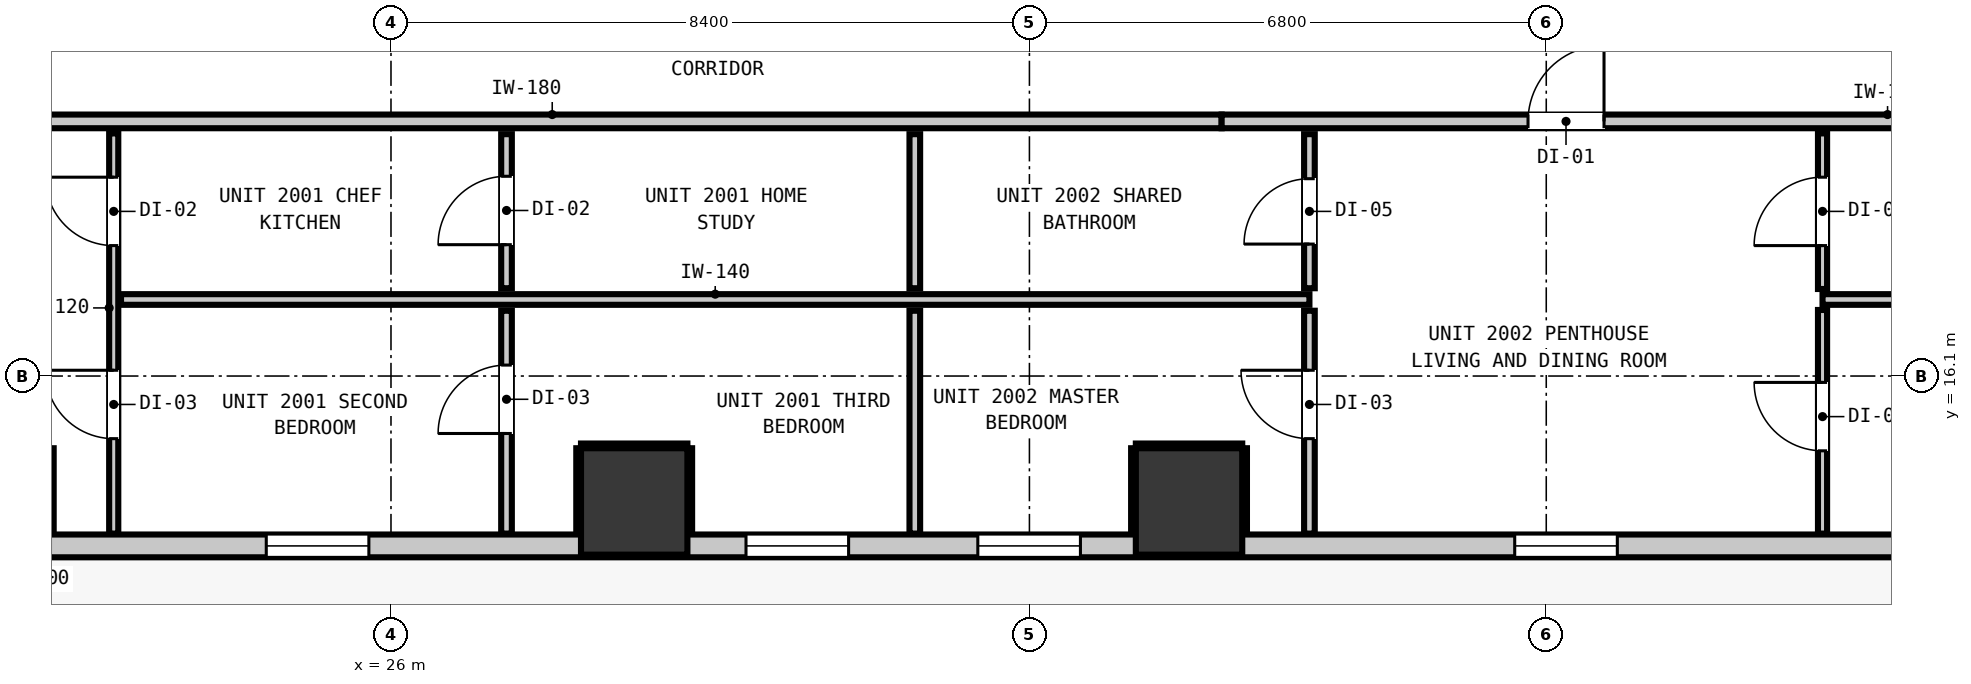
"""IFC4 building model, lengths in metres.
Left out: names, types, materials, properties, quantities, classifications, styles, units other than length and angle.
Written with IfcOpenShell. Run it as: python <this file> out.ifc"""

import sys

from ifc_helpers import new_model, si_unit, direction, frame, frame_2d, origin, origin_2d, place, context, subcontext, project, spatial, rectangle, extrude, element, fill, save


model = new_model("IFC4")
c1 = context("Model", 3, precision=1e-05, world=origin(), true_north=direction((0.0, 1.0)))
c2 = subcontext(c1, "Body", "Model", "MODEL_VIEW")
j1 = project(units=[si_unit("LENGTHUNIT", "METRE"), si_unit("PLANEANGLEUNIT", "RADIAN")], contexts=[c1])
p1 = place(None, origin())
s1 = spatial("IfcSite", under=j1, at=p1, CompositionType="ELEMENT")
p2 = place(p1, origin())
s2 = spatial("IfcBuilding", under=s1, at=p2, CompositionType="ELEMENT")
p3 = place(p2, frame((0.0, 0.0, 71.8)))
s3 = spatial("IfcBuildingStorey", under=s2, at=p3, CompositionType="ELEMENT", Elevation=71.8)
for number, where, z_axis, x_axis in (
    (1, (29.2, 14.45, 0.0), (0.0, 0.0, 1.0), (1.0, 0.0, 0.0)),
    (2, (36.5, 14.45, 0.0), (0.0, 0.0, 1.0), (1.0, 0.0, 0.0)),
):
    element("IfcColumn", number, at=place(p3, frame(where, z_axis=z_axis, x_axis=x_axis)), inside=s3, PredefinedType="COLUMN", context=c2, shape_type="SweptSolid", body=[
        extrude(rectangle(XDim=1.4, YDim=1.4, at=origin_2d()), origin(), (0.0, 0.0, 1.0), 3.32),
    ])
p4 = place(p3, frame((47.835, 13.865, 0.0), z_axis=(0.0, 0.0, 1.0), x_axis=(-1.0, 0.0, 0.0)))
e3 = element("IfcWall", 3, at=p4, inside=s3, PredefinedType="STANDARD", context=c2, shape_type="SweptSolid", body=[
    extrude(rectangle(XDim=37.47, YDim=0.3, at=frame_2d((18.735, 0.0))), origin(), (0.0, 0.0, 1.0), 3.06),
])
p5 = place(p4, frame((0.901, 0.0, 0.0)))
e4 = element("IfcOpeningElement", 4, at=p5, cuts=e3, PredefinedType="OPENING", context=c2, shape_type="SweptSolid", body=[
    extrude(rectangle(XDim=1.0, YDim=2.15, at=frame_2d((0.5, 1.075))), frame((0.0, 0.16, 0.0), z_axis=(0.0, -1.0, 0.0), x_axis=(1.0, 0.0, 0.0)), (0.0, 0.0, 1.0), 0.32),
])
p6 = place(p4, frame((29.57, 0.0, 0.85)))
e5 = element("IfcOpeningElement", 5, at=p6, cuts=e3, PredefinedType="OPENING", context=c2, shape_type="SweptSolid", body=[
    extrude(rectangle(XDim=1.35, YDim=1.85, at=frame_2d((0.675, 0.925))), frame((0.0, 0.16, 0.0), z_axis=(0.0, -1.0, 0.0), x_axis=(1.0, 0.0, 0.0)), (0.0, 0.0, 1.0), 0.32),
])
p7 = place(p4, frame((35.583, 0.0, 0.85)))
e6 = element("IfcOpeningElement", 6, at=p7, cuts=e3, PredefinedType="OPENING", context=c2, shape_type="SweptSolid", body=[
    extrude(rectangle(XDim=1.35, YDim=1.85, at=frame_2d((0.675, 0.925))), frame((0.0, 0.16, 0.0), z_axis=(0.0, -1.0, 0.0), x_axis=(1.0, 0.0, 0.0)), (0.0, 0.0, 1.0), 0.32),
])
p8 = place(p4, frame((22.126, 0.0, 0.85)))
e7 = element("IfcOpeningElement", 7, at=p8, cuts=e3, PredefinedType="OPENING", context=c2, shape_type="SweptSolid", body=[
    extrude(rectangle(XDim=1.35, YDim=1.85, at=frame_2d((0.675, 0.925))), frame((0.0, 0.16, 0.0), z_axis=(0.0, -1.0, 0.0), x_axis=(1.0, 0.0, 0.0)), (0.0, 0.0, 1.0), 0.32),
])
p9 = place(p4, frame((15.814, 0.0, 0.85)))
e8 = element("IfcOpeningElement", 8, at=p9, cuts=e3, PredefinedType="OPENING", context=c2, shape_type="SweptSolid", body=[
    extrude(rectangle(XDim=1.35, YDim=1.85, at=frame_2d((0.675, 0.925))), frame((0.0, 0.16, 0.0), z_axis=(0.0, -1.0, 0.0), x_axis=(1.0, 0.0, 0.0)), (0.0, 0.0, 1.0), 0.32),
])
p10 = place(p4, frame((5.7, 0.0, 0.85)))
e9 = element("IfcOpeningElement", 9, at=p10, cuts=e3, PredefinedType="OPENING", context=c2, shape_type="SweptSolid", body=[
    extrude(rectangle(XDim=1.35, YDim=1.85, at=frame_2d((0.675, 0.925))), frame((0.0, 0.16, 0.0), z_axis=(0.0, -1.0, 0.0), x_axis=(1.0, 0.0, 0.0)), (0.0, 0.0, 1.0), 0.32),
])
p11 = place(p4, frame((12.764, 0.0, 0.85)))
e10 = element("IfcOpeningElement", 10, at=p11, cuts=e3, PredefinedType="OPENING", context=c2, shape_type="SweptSolid", body=[
    extrude(rectangle(XDim=1.35, YDim=1.85, at=frame_2d((0.675, 0.925))), frame((0.0, 0.16, 0.0), z_axis=(0.0, -1.0, 0.0), x_axis=(1.0, 0.0, 0.0)), (0.0, 0.0, 1.0), 0.32),
])
p12 = place(p3, frame((8.027, 19.45, 0.0), z_axis=(0.0, 0.0, 1.0), x_axis=(1.0, 0.0, 0.0)))
e11 = element("IfcWall", 11, at=p12, inside=s3, PredefinedType="PARTITIONING", context=c2, shape_type="SweptSolid", body=[
    extrude(rectangle(XDim=28.902, YDim=0.18, at=frame_2d((14.451, 0.0))), origin(), (0.0, 0.0, 1.0), 3.06),
])
p13 = place(p12, frame((10.187, 0.0, 0.0)))
e12 = element("IfcOpeningElement", 12, at=p13, cuts=e11, PredefinedType="OPENING", context=c2, shape_type="SweptSolid", body=[
    extrude(rectangle(XDim=1.0, YDim=2.15, at=frame_2d((0.5, 1.075))), frame((0.0, 0.1, 0.0), z_axis=(0.0, -1.0, 0.0), x_axis=(1.0, 0.0, 0.0)), (0.0, 0.0, 1.0), 0.2),
])
p14 = place(p3, frame((36.929, 19.45, 0.0), z_axis=(0.0, 0.0, 1.0), x_axis=(1.0, 0.0, 0.0)))
e13 = element("IfcWall", 13, at=p14, inside=s3, PredefinedType="PARTITIONING", context=c2, shape_type="SweptSolid", body=[
    extrude(rectangle(XDim=12.392, YDim=0.18, at=frame_2d((6.196, 0.0))), origin(), (0.0, 0.0, 1.0), 2.445),
])
p15 = place(p14, frame((4.031, 0.0, 0.0)))
e14 = element("IfcOpeningElement", 14, at=p15, cuts=e13, PredefinedType="OPENING", context=c2, shape_type="SweptSolid", body=[
    extrude(rectangle(XDim=1.0, YDim=2.15, at=frame_2d((0.5, 1.075))), frame((0.0, 0.1, 0.0), z_axis=(0.0, -1.0, 0.0), x_axis=(1.0, 0.0, 0.0)), (0.0, 0.0, 1.0), 0.2),
])
p16 = place(p3, frame((22.448, 17.107, 0.0), z_axis=(0.0, 0.0, 1.0), x_axis=(1.0, 0.0, 0.0)))
e15 = element("IfcWall", 15, at=p16, inside=s3, PredefinedType="PARTITIONING", context=c2, shape_type="SweptSolid", body=[
    extrude(rectangle(XDim=15.636, YDim=0.14, at=frame_2d((7.818, 0.0))), origin(), (0.0, 0.0, 1.0), 3.06),
])
p17 = place(p3, frame((44.835, 17.107, 0.0), z_axis=(0.0, 0.0, 1.0), x_axis=(1.0, 0.0, 0.0)))
e16 = element("IfcWall", 16, at=p17, inside=s3, PredefinedType="PARTITIONING", context=c2, shape_type="SweptSolid", body=[
    extrude(rectangle(XDim=5.338, YDim=0.14, at=frame_2d((2.669, 0.0))), origin(), (0.0, 0.0, 1.0), 3.06),
])
p18 = place(p3, frame((27.52, 14.027, 0.0), z_axis=(0.0, 0.0, 1.0), x_axis=(0.0, 1.0, 0.0)))
e17 = element("IfcWall", 17, at=p18, inside=s3, PredefinedType="PARTITIONING", context=c2, shape_type="SweptSolid", body=[
    extrude(rectangle(XDim=2.932, YDim=0.14, at=frame_2d((1.466, 0.0))), origin(), (0.0, 0.0, 1.0), 3.06),
])
p19 = place(p18, frame((1.317, 0.0, 0.0)))
e18 = element("IfcOpeningElement", 18, at=p19, cuts=e17, PredefinedType="OPENING", context=c2, shape_type="SweptSolid", body=[
    extrude(rectangle(XDim=0.9, YDim=2.1, at=frame_2d((0.45, 1.05))), frame((0.0, 0.08, 0.0), z_axis=(0.0, -1.0, 0.0), x_axis=(1.0, 0.0, 0.0)), (0.0, 0.0, 1.0), 0.16),
])
p20 = place(p3, frame((27.52, 17.255, 0.0), z_axis=(0.0, 0.0, 1.0), x_axis=(0.0, 1.0, 0.0)))
e19 = element("IfcWall", 19, at=p20, inside=s3, PredefinedType="PARTITIONING", context=c2, shape_type="SweptSolid", body=[
    extrude(rectangle(XDim=2.027, YDim=0.14, at=frame_2d((1.014, 0.0))), origin(), (0.0, 0.0, 1.0), 3.06),
])
p21 = place(p20, frame((0.573, 0.0, 0.0)))
e20 = element("IfcOpeningElement", 20, at=p21, cuts=e19, PredefinedType="OPENING", context=c2, shape_type="SweptSolid", body=[
    extrude(rectangle(XDim=0.9, YDim=2.1, at=frame_2d((0.45, 1.05))), frame((0.0, 0.08, 0.0), z_axis=(0.0, -1.0, 0.0), x_axis=(1.0, 0.0, 0.0)), (0.0, 0.0, 1.0), 0.16),
])
p22 = place(p3, frame((32.892, 14.027, 0.0), z_axis=(0.0, 0.0, 1.0), x_axis=(0.0, 1.0, 0.0)))
e21 = element("IfcWall", 21, at=p22, inside=s3, PredefinedType="PARTITIONING", context=c2, shape_type="SweptSolid", body=[
    extrude(rectangle(XDim=2.932, YDim=0.14, at=frame_2d((1.466, 0.0))), origin(), (0.0, 0.0, 1.0), 3.06),
])
p23 = place(p3, frame((32.892, 17.255, 0.0), z_axis=(0.0, 0.0, 1.0), x_axis=(0.0, 1.0, 0.0)))
e22 = element("IfcWall", 22, at=p23, inside=s3, PredefinedType="PARTITIONING", context=c2, shape_type="SweptSolid", body=[
    extrude(rectangle(XDim=2.027, YDim=0.14, at=frame_2d((1.014, 0.0))), origin(), (0.0, 0.0, 1.0), 3.06),
])
p24 = place(p3, frame((38.084, 14.027, 0.0), z_axis=(0.0, 0.0, 1.0), x_axis=(0.0, 1.0, 0.0)))
e23 = element("IfcWall", 23, at=p24, inside=s3, PredefinedType="PARTITIONING", context=c2, shape_type="SweptSolid", body=[
    extrude(rectangle(XDim=2.932, YDim=0.14, at=frame_2d((1.466, 0.0))), origin(), (0.0, 0.0, 1.0), 3.06),
])
p25 = place(p24, frame((1.249, 0.0, 0.0)))
e24 = element("IfcOpeningElement", 24, at=p25, cuts=e23, PredefinedType="OPENING", context=c2, shape_type="SweptSolid", body=[
    extrude(rectangle(XDim=0.9, YDim=2.1, at=frame_2d((0.45, 1.05))), frame((0.0, 0.08, 0.0), z_axis=(0.0, -1.0, 0.0), x_axis=(1.0, 0.0, 0.0)), (0.0, 0.0, 1.0), 0.16),
])
p26 = place(p3, frame((38.084, 17.255, 0.0), z_axis=(0.0, 0.0, 1.0), x_axis=(0.0, 1.0, 0.0)))
e25 = element("IfcWall", 25, at=p26, inside=s3, PredefinedType="PARTITIONING", context=c2, shape_type="SweptSolid", body=[
    extrude(rectangle(XDim=2.027, YDim=0.14, at=frame_2d((1.014, 0.0))), origin(), (0.0, 0.0, 1.0), 3.06),
])
p27 = place(p26, frame((0.581, 0.0, 0.0)))
e26 = element("IfcOpeningElement", 26, at=p27, cuts=e25, PredefinedType="OPENING", context=c2, shape_type="SweptSolid", body=[
    extrude(rectangle(XDim=0.86, YDim=2.02, at=frame_2d((0.43, 1.01))), frame((0.0, 0.08, 0.0), z_axis=(0.0, -1.0, 0.0), x_axis=(1.0, 0.0, 0.0)), (0.0, 0.0, 1.0), 0.16),
])
p28 = place(p3, frame((22.352, 14.027, 0.0), z_axis=(0.0, 0.0, 1.0), x_axis=(0.0, 1.0, 0.0)))
e27 = element("IfcWall", 27, at=p28, inside=s3, PredefinedType="PARTITIONING", context=c2, shape_type="SweptSolid", body=[
    extrude(rectangle(XDim=5.265, YDim=0.12, at=frame_2d((2.632, 0.0))), origin(), (0.0, 0.0, 1.0), 3.06),
])
p29 = place(p28, frame((3.789, 0.0, 0.0)))
e28 = element("IfcOpeningElement", 28, at=p29, cuts=e27, PredefinedType="OPENING", context=c2, shape_type="SweptSolid", body=[
    extrude(rectangle(XDim=0.9, YDim=2.1, at=frame_2d((0.45, 1.05))), frame((0.0, 0.07, 0.0), z_axis=(0.0, -1.0, 0.0), x_axis=(1.0, 0.0, 0.0)), (0.0, 0.0, 1.0), 0.14),
])
p30 = place(p28, frame((1.249, 0.0, 0.0)))
e29 = element("IfcOpeningElement", 29, at=p30, cuts=e27, PredefinedType="OPENING", context=c2, shape_type="SweptSolid", body=[
    extrude(rectangle(XDim=0.9, YDim=2.1, at=frame_2d((0.45, 1.05))), frame((0.0, 0.07, 0.0), z_axis=(0.0, -1.0, 0.0), x_axis=(1.0, 0.0, 0.0)), (0.0, 0.0, 1.0), 0.14),
])
p31 = place(p3, frame((44.835, 14.027, 0.0), z_axis=(0.0, 0.0, 1.0), x_axis=(0.0, 1.0, 0.0)))
e30 = element("IfcWall", 30, at=p31, inside=s3, PredefinedType="PARTITIONING", context=c2, shape_type="SweptSolid", body=[
    extrude(rectangle(XDim=2.942, YDim=0.12, at=frame_2d((1.471, 0.0))), origin(), (0.0, 0.0, 1.0), 3.06),
])
p32 = place(p31, frame((1.089, 0.0, 0.0)))
e31 = element("IfcOpeningElement", 31, at=p32, cuts=e30, PredefinedType="OPENING", context=c2, shape_type="SweptSolid", body=[
    extrude(rectangle(XDim=0.9, YDim=2.1, at=frame_2d((0.45, 1.05))), frame((0.0, 0.07, 0.0), z_axis=(0.0, -1.0, 0.0), x_axis=(1.0, 0.0, 0.0)), (0.0, 0.0, 1.0), 0.14),
])
p33 = place(p3, frame((44.835, 17.245, 0.0), z_axis=(0.0, 0.0, 1.0), x_axis=(0.0, 1.0, 0.0)))
e32 = element("IfcWall", 32, at=p33, inside=s3, PredefinedType="PARTITIONING", context=c2, shape_type="SweptSolid", body=[
    extrude(rectangle(XDim=2.047, YDim=0.12, at=frame_2d((1.023, 0.0))), origin(), (0.0, 0.0, 1.0), 3.06),
])
p34 = place(p33, frame((0.571, 0.0, 0.0)))
e33 = element("IfcOpeningElement", 33, at=p34, cuts=e32, PredefinedType="OPENING", context=c2, shape_type="SweptSolid", body=[
    extrude(rectangle(XDim=0.9, YDim=2.1, at=frame_2d((0.45, 1.05))), frame((0.0, 0.07, 0.0), z_axis=(0.0, -1.0, 0.0), x_axis=(1.0, 0.0, 0.0)), (0.0, 0.0, 1.0), 0.14),
])
p35 = place(p3, frame((21.532, 14.03, 0.0), z_axis=(0.0, 0.0, 1.0), x_axis=(0.0, 1.0, 0.0)))
e34 = element("IfcWall", 34, at=p35, inside=s3, PredefinedType="PARTITIONING", context=c2, shape_type="SweptSolid", body=[
    extrude(rectangle(XDim=1.12, YDim=0.06, at=frame_2d((0.56, 0.0))), origin(), (0.0, 0.0, 1.0), 1.45),
])
p36 = place(p3, frame((28.5, 15.182, 0.0), z_axis=(0.0, 0.0, 1.0), x_axis=(1.0, 0.0, 0.0)))
e35 = element("IfcWall", 35, at=p36, inside=s3, PredefinedType="PARTITIONING", context=c2, shape_type="SweptSolid", body=[
    extrude(rectangle(XDim=1.4, YDim=0.06, at=frame_2d((0.7, 0.0))), origin(), (0.0, 0.0, 1.0), 1.45),
])
for number, where, z_axis, x_axis in (
    (36, (28.468, 14.03, 0.0), (0.0, 0.0, 1.0), (0.0, 1.0, 0.0)),
    (37, (29.932, 14.03, 0.0), (0.0, 0.0, 1.0), (0.0, 1.0, 0.0)),
):
    element("IfcWall", number, at=place(p3, frame(where, z_axis=z_axis, x_axis=x_axis)), inside=s3, PredefinedType="PARTITIONING", context=c2, shape_type="SweptSolid", body=[
        extrude(rectangle(XDim=1.12, YDim=0.06, at=frame_2d((0.56, 0.0))), origin(), (0.0, 0.0, 1.0), 1.45),
    ])
p37 = place(p3, frame((35.8, 15.182, 0.0), z_axis=(0.0, 0.0, 1.0), x_axis=(1.0, 0.0, 0.0)))
e38 = element("IfcWall", 38, at=p37, inside=s3, PredefinedType="PARTITIONING", context=c2, shape_type="SweptSolid", body=[
    extrude(rectangle(XDim=1.4, YDim=0.06, at=frame_2d((0.7, 0.0))), origin(), (0.0, 0.0, 1.0), 1.45),
])
for number, where, z_axis, x_axis in (
    (39, (35.768, 14.03, 0.0), (0.0, 0.0, 1.0), (0.0, 1.0, 0.0)),
    (40, (37.232, 14.03, 0.0), (0.0, 0.0, 1.0), (0.0, 1.0, 0.0)),
):
    element("IfcWall", number, at=place(p3, frame(where, z_axis=z_axis, x_axis=x_axis)), inside=s3, PredefinedType="PARTITIONING", context=c2, shape_type="SweptSolid", body=[
        extrude(rectangle(XDim=1.12, YDim=0.06, at=frame_2d((0.56, 0.0))), origin(), (0.0, 0.0, 1.0), 1.45),
    ])
p38 = place(p8, origin())
e41 = element("IfcWindow", 41, at=p38, inside=s3, PartitioningType="SINGLE_PANEL", PredefinedType="WINDOW", context=c2, shape_type="SweptSolid", body=[
    extrude(rectangle(XDim=1.35, YDim=1.85, at=frame_2d((0.675, 0.925))), frame((0.0, 0.03, 0.0), z_axis=(0.0, -1.0, 0.0), x_axis=(1.0, 0.0, 0.0)), (0.0, 0.0, 1.0), 0.06),
])
fill(e7, e41)
p39 = place(p9, origin())
e42 = element("IfcWindow", 42, at=p39, inside=s3, PartitioningType="SINGLE_PANEL", PredefinedType="WINDOW", context=c2, shape_type="SweptSolid", body=[
    extrude(rectangle(XDim=1.35, YDim=1.85, at=frame_2d((0.675, 0.925))), frame((0.0, 0.03, 0.0), z_axis=(0.0, -1.0, 0.0), x_axis=(1.0, 0.0, 0.0)), (0.0, 0.0, 1.0), 0.06),
])
fill(e8, e42)
p40 = place(p10, origin())
e43 = element("IfcWindow", 43, at=p40, inside=s3, PartitioningType="SINGLE_PANEL", PredefinedType="WINDOW", context=c2, shape_type="SweptSolid", body=[
    extrude(rectangle(XDim=1.35, YDim=1.85, at=frame_2d((0.675, 0.925))), frame((0.0, 0.03, 0.0), z_axis=(0.0, -1.0, 0.0), x_axis=(1.0, 0.0, 0.0)), (0.0, 0.0, 1.0), 0.06),
])
fill(e9, e43)
p41 = place(p11, origin())
e44 = element("IfcWindow", 44, at=p41, inside=s3, PartitioningType="SINGLE_PANEL", PredefinedType="WINDOW", context=c2, shape_type="SweptSolid", body=[
    extrude(rectangle(XDim=1.35, YDim=1.85, at=frame_2d((0.675, 0.925))), frame((0.0, 0.03, 0.0), z_axis=(0.0, -1.0, 0.0), x_axis=(1.0, 0.0, 0.0)), (0.0, 0.0, 1.0), 0.06),
])
fill(e10, e44)
p42 = place(p29, origin())
e45 = element("IfcDoor", 45, at=p42, inside=s3, OperationType="SINGLE_SWING_RIGHT", PredefinedType="DOOR", context=c2, shape_type="SweptSolid", body=[
    extrude(rectangle(XDim=0.9, YDim=2.1, at=frame_2d((0.45, 1.05))), frame((0.0, 0.025, 0.0), z_axis=(0.0, -1.0, 0.0), x_axis=(1.0, 0.0, 0.0)), (0.0, 0.0, 1.0), 0.05),
])
fill(e28, e45)
p43 = place(p21, origin())
e46 = element("IfcDoor", 46, at=p43, inside=s3, OperationType="SINGLE_SWING_LEFT", PredefinedType="DOOR", context=c2, shape_type="SweptSolid", body=[
    extrude(rectangle(XDim=0.9, YDim=2.1, at=frame_2d((0.45, 1.05))), frame((0.0, 0.025, 0.0), z_axis=(0.0, -1.0, 0.0), x_axis=(1.0, 0.0, 0.0)), (0.0, 0.0, 1.0), 0.05),
])
fill(e20, e46)
p44 = place(p30, origin())
e47 = element("IfcDoor", 47, at=p44, inside=s3, OperationType="SINGLE_SWING_RIGHT", PredefinedType="DOOR", context=c2, shape_type="SweptSolid", body=[
    extrude(rectangle(XDim=0.9, YDim=2.1, at=frame_2d((0.45, 1.05))), frame((0.0, 0.025, 0.0), z_axis=(0.0, -1.0, 0.0), x_axis=(1.0, 0.0, 0.0)), (0.0, 0.0, 1.0), 0.05),
])
fill(e29, e47)
p45 = place(p19, origin())
e48 = element("IfcDoor", 48, at=p45, inside=s3, OperationType="SINGLE_SWING_LEFT", PredefinedType="DOOR", context=c2, shape_type="SweptSolid", body=[
    extrude(rectangle(XDim=0.9, YDim=2.1, at=frame_2d((0.45, 1.05))), frame((0.0, 0.025, 0.0), z_axis=(0.0, -1.0, 0.0), x_axis=(1.0, 0.0, 0.0)), (0.0, 0.0, 1.0), 0.05),
])
fill(e18, e48)
p46 = place(p15, origin())
e49 = element("IfcDoor", 49, at=p46, inside=s3, OperationType="SINGLE_SWING_RIGHT", PredefinedType="DOOR", context=c2, shape_type="SweptSolid", body=[
    extrude(rectangle(XDim=1.0, YDim=2.15, at=frame_2d((0.5, 1.075))), frame((0.0, 0.025, 0.0), z_axis=(0.0, -1.0, 0.0), x_axis=(1.0, 0.0, 0.0)), (0.0, 0.0, 1.0), 0.05),
])
fill(e14, e49)
p47 = place(p27, origin())
e50 = element("IfcDoor", 50, at=p47, inside=s3, OperationType="SINGLE_SWING_LEFT", PredefinedType="DOOR", context=c2, shape_type="SweptSolid", body=[
    extrude(rectangle(XDim=0.86, YDim=2.02, at=frame_2d((0.43, 1.01))), frame((0.0, 0.025, 0.0), z_axis=(0.0, -1.0, 0.0), x_axis=(1.0, 0.0, 0.0)), (0.0, 0.0, 1.0), 0.05),
])
fill(e26, e50)
p48 = place(p25, origin())
e51 = element("IfcDoor", 51, at=p48, inside=s3, OperationType="SINGLE_SWING_RIGHT", PredefinedType="DOOR", context=c2, shape_type="SweptSolid", body=[
    extrude(rectangle(XDim=0.9, YDim=2.1, at=frame_2d((0.45, 1.05))), frame((0.0, 0.025, 0.0), z_axis=(0.0, -1.0, 0.0), x_axis=(1.0, 0.0, 0.0)), (0.0, 0.0, 1.0), 0.05),
])
fill(e24, e51)
p49 = place(p34, origin())
e52 = element("IfcDoor", 52, at=p49, inside=s3, OperationType="SINGLE_SWING_LEFT", PredefinedType="DOOR", context=c2, shape_type="SweptSolid", body=[
    extrude(rectangle(XDim=0.9, YDim=2.1, at=frame_2d((0.45, 1.05))), frame((0.0, 0.025, 0.0), z_axis=(0.0, -1.0, 0.0), x_axis=(1.0, 0.0, 0.0)), (0.0, 0.0, 1.0), 0.05),
])
fill(e33, e52)
p50 = place(p32, origin())
e53 = element("IfcDoor", 53, at=p50, inside=s3, OperationType="SINGLE_SWING_RIGHT", PredefinedType="DOOR", context=c2, shape_type="SweptSolid", body=[
    extrude(rectangle(XDim=0.9, YDim=2.1, at=frame_2d((0.45, 1.05))), frame((0.0, 0.025, 0.0), z_axis=(0.0, -1.0, 0.0), x_axis=(1.0, 0.0, 0.0)), (0.0, 0.0, 1.0), 0.05),
])
fill(e31, e53)
save(model, sys.argv[1])
